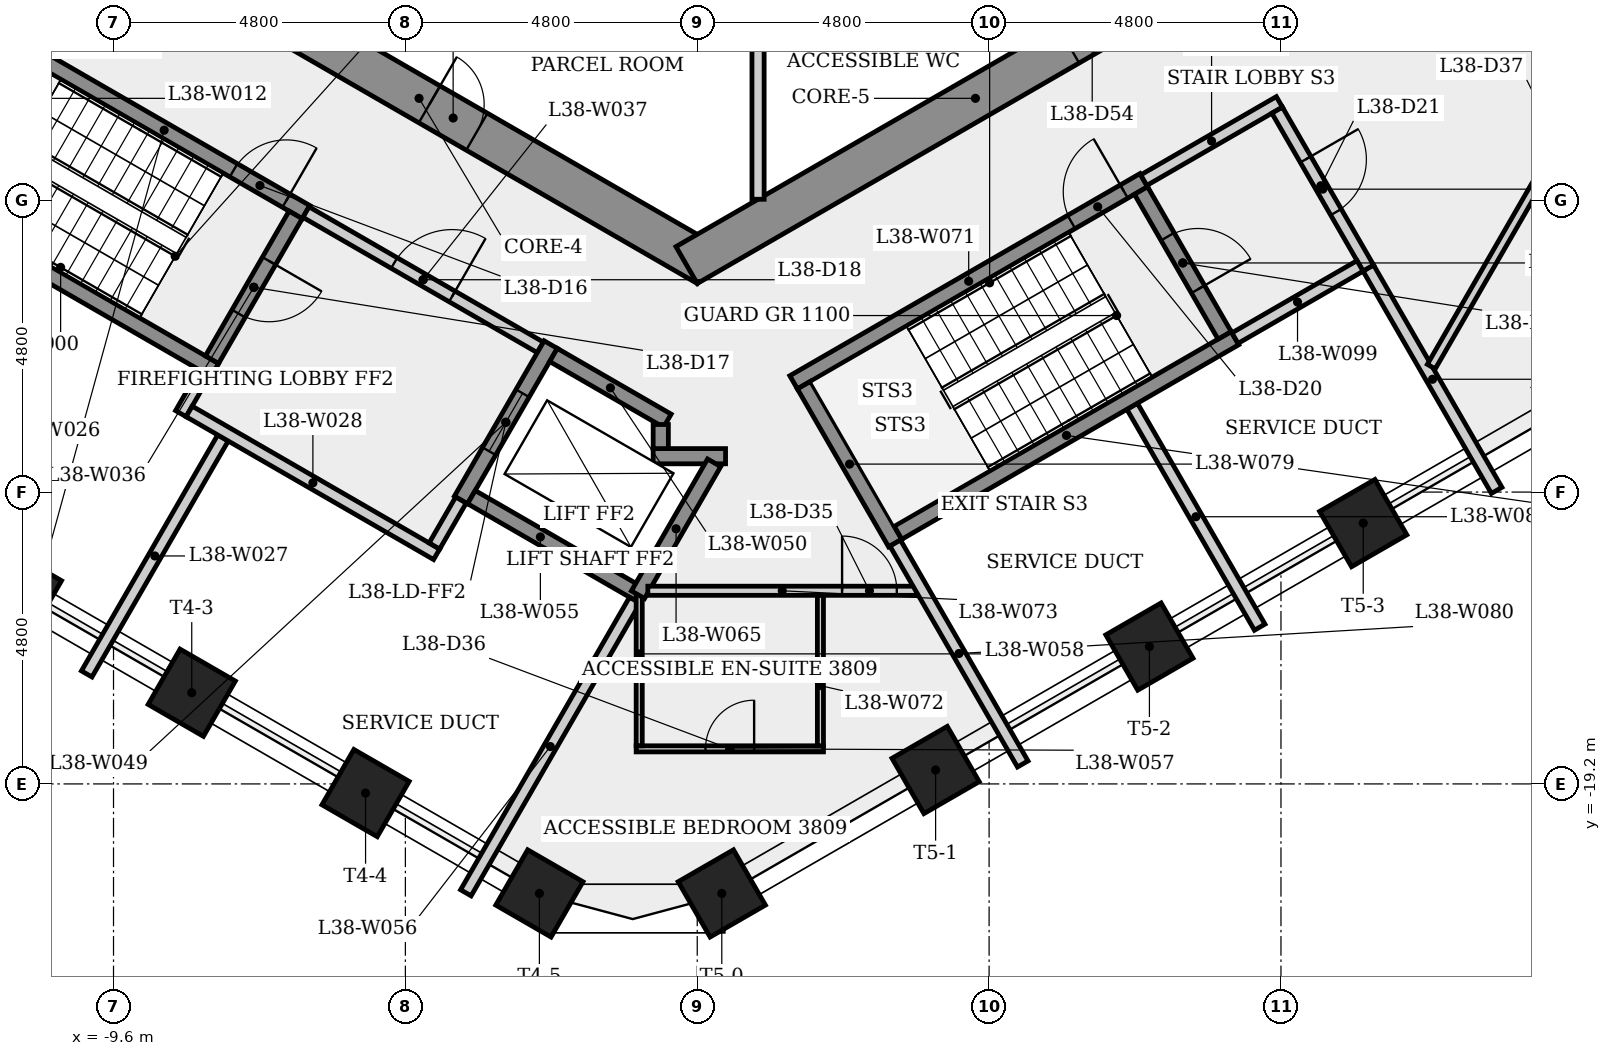
"""IFC4 building model, lengths in metres.
Left out: names, types, materials, properties, quantities, classifications, styles, units other than length and angle.
Written with IfcOpenShell. Run it as: python <this file> out.ifc"""

import sys

from ifc_helpers import new_model, si_unit, direction, frame, frame_2d, origin, origin_2d, place, context, subcontext, project, spatial, rectangle, extrude, element, fill, save


model = new_model("IFC4")
c1 = context("Model", 3, precision=1e-05, world=origin(), true_north=direction((0.0, 1.0)))
c2 = subcontext(c1, "Body", "Model", "MODEL_VIEW")
j1 = project(units=[si_unit("LENGTHUNIT", "METRE"), si_unit("PLANEANGLEUNIT", "RADIAN")], contexts=[c1])
p1 = place(None, origin())
s1 = spatial("IfcSite", under=j1, at=p1, CompositionType="ELEMENT")
p2 = place(p1, origin())
s2 = spatial("IfcBuilding", under=s1, at=p2, CompositionType="ELEMENT")
p3 = place(p2, frame((0.0, 0.0, 143.9)))
s3 = spatial("IfcBuildingStorey", under=s2, at=p3, CompositionType="ELEMENT", Elevation=143.9)
p4 = place(p3, frame((-9.325, -5.182, 0.0), z_axis=(0.0, 0.0, 1.0), x_axis=(0.866023993627, -0.500002442456, 0.0)))
e1 = element("IfcWall", 1, at=p4, inside=s3, PredefinedType="SHEAR", context=c2, shape_type="SweptSolid", body=[
    extrude(rectangle(XDim=10.97, YDim=0.7, at=frame_2d((5.485, 0.0))), origin(), (0.0, 0.0, 1.0), 4.0),
])
p5 = place(p4, frame((5.682, 0.0, 0.0)))
e2 = element("IfcOpeningElement", 2, at=p5, cuts=e1, PredefinedType="OPENING", context=c2, shape_type="SweptSolid", body=[
    extrude(rectangle(XDim=0.9, YDim=2.1, at=frame_2d((0.45, 1.05))), frame((0.0, 0.36, 0.0), z_axis=(0.0, -1.0, 0.0), x_axis=(1.0, 0.0, 0.0)), (0.0, 0.0, 1.0), 0.72),
])
p6 = place(p3, frame((-0.175, -10.667, 0.0), z_axis=(0.0, 0.0, 1.0), x_axis=(0.866023993627, 0.500002442456, 0.0)))
e3 = element("IfcWall", 3, at=p6, inside=s3, PredefinedType="SHEAR", context=c2, shape_type="SweptSolid", body=[
    extrude(rectangle(XDim=10.97, YDim=0.7, at=frame_2d((5.485, 0.0))), origin(), (0.0, 0.0, 1.0), 4.0),
])
p7 = place(p6, frame((7.252, 0.0, 0.0)))
e4 = element("IfcOpeningElement", 4, at=p7, cuts=e3, PredefinedType="OPENING", context=c2, shape_type="SweptSolid", body=[
    extrude(rectangle(XDim=0.9, YDim=2.1, at=frame_2d((0.45, 1.05))), frame((0.0, 0.36, 0.0), z_axis=(0.0, -1.0, 0.0), x_axis=(1.0, 0.0, 0.0)), (0.0, 0.0, 1.0), 0.72),
])
for number, where, z_axis, x_axis in (
    (5, (-11.172, -16.05, 0.0), (0.0, 0.0, 1.0), (-0.5, -0.866, 0.0)),
    (6, (-8.313, -17.7, 0.0), (0.0, 0.0, 1.0), (-0.5, -0.866, 0.0)),
    (7, (-5.455, -19.351, 0.0), (0.0, 0.0, 1.0), (-0.5, -0.866, 0.0)),
    (8, (-2.596, -21.001, 0.0), (0.0, 0.0, 1.0), (-0.5, -0.866, 0.0)),
    (9, (0.404, -21.001, 0.0), (0.0, 0.0, 1.0), (0.5, -0.866, 0.0)),
    (10, (3.92, -18.971, 0.0), (0.0, 0.0, 1.0), (0.5, -0.866, 0.0)),
    (11, (7.437, -16.941, 0.0), (0.0, 0.0, 1.0), (0.5, -0.866, 0.0)),
    (12, (10.953, -14.911, 0.0), (0.0, 0.0, 1.0), (0.5, -0.866, 0.0)),
):
    element("IfcColumn", number, at=place(p3, frame(where, z_axis=z_axis, x_axis=x_axis)), inside=s3, PredefinedType="COLUMN", context=c2, shape_type="SweptSolid", body=[
        extrude(rectangle(XDim=1.05, YDim=1.05, at=origin_2d()), origin(), (0.0, 0.0, 1.0), 4.0),
    ])
p8 = place(p3, frame((-11.1, -7.101, 0.0), z_axis=(0.0, 0.0, 1.0), x_axis=(0.866028615007, -0.499994437958, 0.0)))
e13 = element("IfcWall", 13, at=p8, inside=s3, PredefinedType="SHEAR", context=c2, shape_type="SweptSolid", body=[
    extrude(rectangle(XDim=5.387, YDim=0.25, at=frame_2d((2.694, 0.0))), origin(), (0.0, 0.0, 1.0), 3.6),
])
p9 = place(p8, frame((4.012, 0.0, 0.0)))
e14 = element("IfcOpeningElement", 14, at=p9, cuts=e13, PredefinedType="OPENING", context=c2, shape_type="SweptSolid", body=[
    extrude(rectangle(XDim=1.0, YDim=2.1, at=frame_2d((0.5, 1.05))), frame((0.0, 0.135, 0.0), z_axis=(0.0, -1.0, 0.0), x_axis=(1.0, 0.0, 0.0)), (0.0, 0.0, 1.0), 0.27),
])
p10 = place(p3, frame((-8.493, -13.11, 0.0), z_axis=(0.0, 0.0, 1.0), x_axis=(0.500067724834, 0.865986299303, 0.0)))
e15 = element("IfcWall", 15, at=p10, inside=s3, PredefinedType="PLUMBINGWALL", context=c2, shape_type="SweptSolid", body=[
    extrude(rectangle(XDim=0.775, YDim=0.2, at=frame_2d((0.388, 0.0))), origin(), (0.0, 0.0, 1.0), 3.6),
])
p11 = place(p3, frame((-7.935, -12.393, 0.0), z_axis=(0.0, 0.0, 1.0), x_axis=(-0.866025499775, 0.499999833739, 0.0)))
e16 = element("IfcWall", 16, at=p11, inside=s3, PredefinedType="SHEAR", context=c2, shape_type="SweptSolid", body=[
    extrude(rectangle(XDim=6.4, YDim=0.25, at=frame_2d((3.2, 0.0))), origin(), (0.0, 0.0, 1.0), 3.6),
])
p12 = place(p3, frame((-7.8, -13.51, 0.0), z_axis=(0.0, 0.0, 1.0), x_axis=(-0.499994393058, -0.866028640929, 0.0)))
e17 = element("IfcWall", 17, at=p12, inside=s3, PredefinedType="PLUMBINGWALL", context=c2, shape_type="SweptSolid", body=[
    extrude(rectangle(XDim=4.481, YDim=0.2, at=frame_2d((2.241, 0.0))), origin(), (0.0, 0.0, 1.0), 3.6),
])
p13 = place(p3, frame((-8.356, -13.073, 0.0), z_axis=(0.0, 0.0, 1.0), x_axis=(0.866038532462, -0.499977259774, 0.0)))
e18 = element("IfcWall", 18, at=p13, inside=s3, PredefinedType="PLUMBINGWALL", context=c2, shape_type="SweptSolid", body=[
    extrude(rectangle(XDim=4.7, YDim=0.2, at=frame_2d((2.35, 0.0))), origin(), (0.0, 0.0, 1.0), 3.6),
])
p14 = place(p3, frame((-6.605, -9.841, 0.0), z_axis=(0.0, 0.0, 1.0), x_axis=(-0.499996545922, -0.866027397988, 0.0)))
e19 = element("IfcWall", 19, at=p14, inside=s3, PredefinedType="SHEAR", context=c2, shape_type="SweptSolid", body=[
    extrude(rectangle(XDim=2.75, YDim=0.25, at=frame_2d((1.375, 0.0))), origin(), (0.0, 0.0, 1.0), 3.6),
])
p15 = place(p14, frame((0.875, 0.0, 0.0)))
e20 = element("IfcOpeningElement", 20, at=p15, cuts=e19, PredefinedType="OPENING", context=c2, shape_type="SweptSolid", body=[
    extrude(rectangle(XDim=1.0, YDim=2.1, at=frame_2d((0.5, 1.05))), frame((0.0, 0.135, 0.0), z_axis=(0.0, -1.0, 0.0), x_axis=(1.0, 0.0, 0.0)), (0.0, 0.0, 1.0), 0.27),
])
p16 = place(p3, frame((-6.435, -9.795, 0.0), z_axis=(0.0, 0.0, 1.0), x_axis=(0.866012907634, -0.500021643343, 0.0)))
e21 = element("IfcWall", 21, at=p16, inside=s3, PredefinedType="PARTITIONING", context=c2, shape_type="SweptSolid", body=[
    extrude(rectangle(XDim=4.45, YDim=0.2, at=frame_2d((2.225, 0.0))), origin(), (0.0, 0.0, 1.0), 3.6),
])
p17 = place(p16, frame((1.675, 0.0, 0.0)))
e22 = element("IfcOpeningElement", 22, at=p17, cuts=e21, PredefinedType="OPENING", context=c2, shape_type="SweptSolid", body=[
    extrude(rectangle(XDim=1.1, YDim=2.1, at=frame_2d((0.55, 1.05))), frame((0.0, 0.11, 0.0), z_axis=(0.0, -1.0, 0.0), x_axis=(1.0, 0.0, 0.0)), (0.0, 0.0, 1.0), 0.22),
])
p18 = place(p3, frame((-3.885, -14.529, 0.0), z_axis=(0.0, 0.0, 1.0), x_axis=(-0.499859285417, -0.866106630146, 0.0)))
e23 = element("IfcWall", 23, at=p18, inside=s3, PredefinedType="PLUMBINGWALL", context=c2, shape_type="SweptSolid", body=[
    extrude(rectangle(XDim=0.875, YDim=0.2, at=frame_2d((0.438, 0.0))), origin(), (0.0, 0.0, 1.0), 3.6),
])
p19 = place(p3, frame((-2.41, -11.974, 0.0), z_axis=(0.0, 0.0, 1.0), x_axis=(-0.500001826776, -0.866024349092, 0.0)))
e24 = element("IfcWall", 24, at=p19, inside=s3, PredefinedType="SHEAR", context=c2, shape_type="SweptSolid", body=[
    extrude(rectangle(XDim=2.95, YDim=0.25, at=frame_2d((1.475, 0.0))), origin(), (0.0, 0.0, 1.0), 3.6),
])
p20 = place(p19, frame((0.925, 0.0, 0.0)))
e25 = element("IfcOpeningElement", 25, at=p20, cuts=e24, PredefinedType="OPENING", context=c2, shape_type="SweptSolid", body=[
    extrude(rectangle(XDim=1.1, YDim=2.1, at=frame_2d((0.55, 1.05))), frame((0.0, 0.135, 0.0), z_axis=(0.0, -1.0, 0.0), x_axis=(1.0, 0.0, 0.0)), (0.0, 0.0, 1.0), 0.27),
])
p21 = place(p3, frame((-2.364, -12.145, 0.0), z_axis=(0.0, 0.0, 1.0), x_axis=(0.86603892542, -0.499976579108, 0.0)))
e26 = element("IfcWall", 26, at=p21, inside=s3, PredefinedType="SHEAR", context=c2, shape_type="SweptSolid", body=[
    extrude(rectangle(XDim=2.162, YDim=0.25, at=frame_2d((1.081, 0.0))), origin(), (0.0, 0.0, 1.0), 3.6),
])
p22 = place(p3, frame((-0.878, -16.121, 0.0), z_axis=(0.0, 0.0, 1.0), x_axis=(-0.866027924134, 0.499995634601, 0.0)))
e27 = element("IfcWall", 27, at=p22, inside=s3, PredefinedType="SHEAR", context=c2, shape_type="SweptSolid", body=[
    extrude(rectangle(XDim=3.275, YDim=0.25, at=frame_2d((1.637, 0.0))), origin(), (0.0, 0.0, 1.0), 3.6),
])
p23 = place(p3, frame((-1.027, -16.179, 0.0), z_axis=(0.0, 0.0, 1.0), x_axis=(-0.499995019066, -0.866028279509, 0.0)))
e28 = element("IfcWall", 28, at=p23, inside=s3, PredefinedType="PLUMBINGWALL", context=c2, shape_type="SweptSolid", body=[
    extrude(rectangle(XDim=5.557, YDim=0.2, at=frame_2d((2.778, 0.0))), origin(), (0.0, 0.0, 1.0), 3.6),
])
p24 = place(p3, frame((-1.004, -18.623, 0.0), z_axis=(0.0, 0.0, 1.0), x_axis=(1.0, 0.0, 0.0)))
e29 = element("IfcWall", 29, at=p24, inside=s3, PredefinedType="PARTITIONING", context=c2, shape_type="SweptSolid", body=[
    extrude(rectangle(XDim=3.08, YDim=0.1, at=frame_2d((1.54, 0.0))), origin(), (0.0, 0.0, 1.0), 3.6),
])
p25 = place(p24, frame((1.14, 0.0, 0.0)))
e30 = element("IfcOpeningElement", 30, at=p25, cuts=e29, PredefinedType="OPENING", context=c2, shape_type="SweptSolid", body=[
    extrude(rectangle(XDim=0.8, YDim=2.1, at=frame_2d((0.4, 1.05))), frame((0.0, 0.06, 0.0), z_axis=(0.0, -1.0, 0.0), x_axis=(1.0, 0.0, 0.0)), (0.0, 0.0, 1.0), 0.12),
])
p26 = place(p3, frame((-0.955, -16.053, 0.0), z_axis=(0.0, 0.0, 1.0), x_axis=(0.0, -1.0, 0.0)))
e31 = element("IfcWall", 31, at=p26, inside=s3, PredefinedType="PARTITIONING", context=c2, shape_type="SweptSolid", body=[
    extrude(rectangle(XDim=2.52, YDim=0.1, at=frame_2d((1.26, 0.0))), origin(), (0.0, 0.0, 1.0), 3.6),
])
p27 = place(p3, frame((-0.725, -13.81, 0.0), z_axis=(0.0, 0.0, 1.0), x_axis=(1.0, 0.0, 0.0)))
e32 = element("IfcWall", 32, at=p27, inside=s3, PredefinedType="SHEAR", context=c2, shape_type="SweptSolid", body=[
    extrude(rectangle(XDim=1.191, YDim=0.25, at=frame_2d((0.595, 0.0))), origin(), (0.0, 0.0, 1.0), 3.6),
])
p28 = place(p3, frame((-0.6, -13.289, 0.0), z_axis=(0.0, 0.0, 1.0), x_axis=(0.0, -1.0, 0.0)))
e33 = element("IfcWall", 33, at=p28, inside=s3, PredefinedType="SHEAR", context=c2, shape_type="SweptSolid", body=[
    extrude(rectangle(XDim=0.396, YDim=0.25, at=frame_2d((0.198, 0.0))), origin(), (0.0, 0.0, 1.0), 4.0),
])
p29 = place(p3, frame((0.278, -13.918, 0.0), z_axis=(0.0, 0.0, 1.0), x_axis=(-0.49996424941, -0.866046043413, 0.0)))
e34 = element("IfcWall", 34, at=p29, inside=s3, PredefinedType="SHEAR", context=c2, shape_type="SweptSolid", body=[
    extrude(rectangle(XDim=2.506, YDim=0.25, at=frame_2d((1.253, 0.0))), origin(), (0.0, 0.0, 1.0), 4.0),
])
p30 = place(p3, frame((1.0, -5.275, 0.0), z_axis=(0.0, 0.0, 1.0), x_axis=(0.0, -1.0, 0.0)))
e35 = element("IfcWall", 35, at=p30, inside=s3, PredefinedType="PARTITIONING", context=c2, shape_type="SweptSolid", body=[
    extrude(rectangle(XDim=4.309, YDim=0.2, at=frame_2d((2.155, 0.0))), origin(), (0.0, 0.0, 1.0), 3.6),
])
p31 = place(p3, frame((1.585, -12.595, 0.0), z_axis=(0.0, 0.0, 1.0), x_axis=(0.866036417653, 0.499980922934, 0.0)))
e36 = element("IfcWall", 36, at=p31, inside=s3, PredefinedType="SHEAR", context=c2, shape_type="SweptSolid", body=[
    extrude(rectangle(XDim=6.65, YDim=0.25, at=frame_2d((3.325, 0.0))), origin(), (0.0, 0.0, 1.0), 3.6),
])
p32 = place(p31, frame((5.275, 0.0, 0.0)))
e37 = element("IfcOpeningElement", 37, at=p32, cuts=e36, PredefinedType="OPENING", context=c2, shape_type="SweptSolid", body=[
    extrude(rectangle(XDim=1.0, YDim=2.1, at=frame_2d((0.5, 1.05))), frame((0.0, 0.135, 0.0), z_axis=(0.0, -1.0, 0.0), x_axis=(1.0, 0.0, 0.0)), (0.0, 0.0, 1.0), 0.27),
])
p33 = place(p3, frame((2.026, -18.573, 0.0), z_axis=(0.0, 0.0, 1.0), x_axis=(0.0, 1.0, 0.0)))
e38 = element("IfcWall", 38, at=p33, inside=s3, PredefinedType="PARTITIONING", context=c2, shape_type="SweptSolid", body=[
    extrude(rectangle(XDim=2.475, YDim=0.1, at=frame_2d((1.238, 0.0))), origin(), (0.0, 0.0, 1.0), 3.6),
])
p34 = place(p3, frame((-0.812, -16.023, 0.0), z_axis=(0.0, 0.0, 1.0), x_axis=(1.0, 0.0, 0.0)))
e39 = element("IfcWall", 39, at=p34, inside=s3, PredefinedType="PARTITIONING", context=c2, shape_type="SweptSolid", body=[
    extrude(rectangle(XDim=4.42, YDim=0.15, at=frame_2d((2.21, 0.0))), origin(), (0.0, 0.0, 1.0), 3.6),
])
p35 = place(p34, frame((3.194, 0.0, 0.0)))
e40 = element("IfcOpeningElement", 40, at=p35, cuts=e39, PredefinedType="OPENING", context=c2, shape_type="SweptSolid", body=[
    extrude(rectangle(XDim=0.9, YDim=2.1, at=frame_2d((0.45, 1.05))), frame((0.0, 0.085, 0.0), z_axis=(0.0, -1.0, 0.0), x_axis=(1.0, 0.0, 0.0)), (0.0, 0.0, 1.0), 0.17),
])
p36 = place(p3, frame((3.256, -15.239, 0.0), z_axis=(0.0, 0.0, 1.0), x_axis=(-0.50002537861, 0.866010750942, 0.0)))
e41 = element("IfcWall", 41, at=p36, inside=s3, PredefinedType="SHEAR", context=c2, shape_type="SweptSolid", body=[
    extrude(rectangle(XDim=3.0, YDim=0.25, at=frame_2d((1.5, 0.0))), origin(), (0.0, 0.0, 1.0), 3.6),
])
for number, where, z_axis, x_axis in (
    (42, (3.256, -15.239, 0.0), (0.0, 0.0, 1.0), (0.5, -0.866, 0.0)),
    (43, (7.153, -12.989, 0.0), (0.0, 0.0, 1.0), (0.5, -0.866, 0.0)),
):
    element("IfcWall", number, at=place(p3, frame(where, z_axis=z_axis, x_axis=x_axis)), inside=s3, PredefinedType="PLUMBINGWALL", context=c2, shape_type="SweptSolid", body=[
        extrude(rectangle(XDim=4.195, YDim=0.2, at=frame_2d((2.098, 0.0))), origin(), (0.0, 0.0, 1.0), 3.6),
    ])
p37 = place(p3, frame((3.301, -15.068, 0.0), z_axis=(0.0, 0.0, 1.0), x_axis=(0.866035036182, 0.499983315828, 0.0)))
e44 = element("IfcWall", 44, at=p37, inside=s3, PredefinedType="SHEAR", context=c2, shape_type="SweptSolid", body=[
    extrude(rectangle(XDim=6.4, YDim=0.25, at=frame_2d((3.2, 0.0))), origin(), (0.0, 0.0, 1.0), 4.0),
])
p38 = place(p3, frame((7.298, -9.441, 0.0), z_axis=(0.0, 0.0, 1.0), x_axis=(0.500034990121, -0.866005201286, 0.0)))
e45 = element("IfcWall", 45, at=p38, inside=s3, PredefinedType="SHEAR", context=c2, shape_type="SweptSolid", body=[
    extrude(rectangle(XDim=2.75, YDim=0.25, at=frame_2d((1.375, 0.0))), origin(), (0.0, 0.0, 1.0), 3.6),
])
p39 = place(p38, frame((0.875, 0.0, 0.0)))
e46 = element("IfcOpeningElement", 46, at=p39, cuts=e45, PredefinedType="OPENING", context=c2, shape_type="SweptSolid", body=[
    extrude(rectangle(XDim=1.0, YDim=2.1, at=frame_2d((0.5, 1.05))), frame((0.0, 0.135, 0.0), z_axis=(0.0, -1.0, 0.0), x_axis=(1.0, 0.0, 0.0)), (0.0, 0.0, 1.0), 0.27),
])
p40 = place(p3, frame((7.344, -9.27, 0.0), z_axis=(0.0, 0.0, 1.0), x_axis=(0.866005588531, 0.500034319456, 0.0)))
e47 = element("IfcWall", 47, at=p40, inside=s3, PredefinedType="PARTITIONING", context=c2, shape_type="SweptSolid", body=[
    extrude(rectangle(XDim=2.575, YDim=0.2, at=frame_2d((1.288, 0.0))), origin(), (0.0, 0.0, 1.0), 3.6),
])
p41 = place(p3, frame((9.537, -8.119, 0.0), z_axis=(0.0, 0.0, 1.0), x_axis=(0.499990139034, -0.866031096941, 0.0)))
e48 = element("IfcWall", 48, at=p41, inside=s3, PredefinedType="PARTITIONING", context=c2, shape_type="SweptSolid", body=[
    extrude(rectangle(XDim=3.0, YDim=0.2, at=frame_2d((1.5, 0.0))), origin(), (0.0, 0.0, 1.0), 3.6),
])
p42 = place(p41, frame((0.935, 0.0, 0.0)))
e49 = element("IfcOpeningElement", 49, at=p42, cuts=e48, PredefinedType="OPENING", context=c2, shape_type="SweptSolid", body=[
    extrude(rectangle(XDim=1.0, YDim=2.1, at=frame_2d((0.5, 1.05))), frame((0.0, 0.11, 0.0), z_axis=(0.0, -1.0, 0.0), x_axis=(1.0, 0.0, 0.0)), (0.0, 0.0, 1.0), 0.22),
])
p43 = place(p3, frame((10.901, -10.681, 0.0), z_axis=(0.0, 0.0, 1.0), x_axis=(-0.866007538022, -0.500030943131, 0.0)))
e50 = element("IfcWall", 50, at=p43, inside=s3, PredefinedType="PLUMBINGWALL", context=c2, shape_type="SweptSolid", body=[
    extrude(rectangle(XDim=2.375, YDim=0.2, at=frame_2d((1.188, 0.0))), origin(), (0.0, 0.0, 1.0), 3.6),
])
p44 = place(p3, frame((11.037, -10.717, 0.0), z_axis=(0.0, 0.0, 1.0), x_axis=(0.500002884005, -0.866023738697, 0.0)))
e51 = element("IfcWall", 51, at=p44, inside=s3, PredefinedType="PLUMBINGWALL", context=c2, shape_type="SweptSolid", body=[
    extrude(rectangle(XDim=4.22, YDim=0.2, at=frame_2d((2.11, 0.0))), origin(), (0.0, 0.0, 1.0), 3.6),
])
p45 = place(p3, frame((16.285, -5.041, 0.0), z_axis=(0.0, 0.0, 1.0), x_axis=(-0.499997548519, -0.866026819143, 0.0)))
e52 = element("IfcWall", 52, at=p45, inside=s3, PredefinedType="PARTITIONING", context=c2, shape_type="SweptSolid", body=[
    extrude(rectangle(XDim=8.425, YDim=0.15, at=frame_2d((4.212, 0.0))), origin(), (0.0, 0.0, 1.0), 3.6),
])
p46 = place(p45, frame((3.712, 0.0, 0.0)))
e53 = element("IfcOpeningElement", 53, at=p46, cuts=e52, PredefinedType="OPENING", context=c2, shape_type="SweptSolid", body=[
    extrude(rectangle(XDim=1.0, YDim=2.1, at=frame_2d((0.5, 1.05))), frame((0.0, 0.085, 0.0), z_axis=(0.0, -1.0, 0.0), x_axis=(1.0, 0.0, 0.0)), (0.0, 0.0, 1.0), 0.17),
])
p47 = place(p9, origin())
e54 = element("IfcDoor", 54, at=p47, inside=s3, OperationType="SINGLE_SWING_RIGHT", PredefinedType="DOOR", context=c2, shape_type="SweptSolid", body=[
    extrude(rectangle(XDim=1.0, YDim=2.1, at=frame_2d((0.5, 1.05))), frame((0.0, 0.025, 0.0), z_axis=(0.0, -1.0, 0.0), x_axis=(1.0, 0.0, 0.0)), (0.0, 0.0, 1.0), 0.05),
])
fill(e14, e54)
p48 = place(p15, origin())
e55 = element("IfcDoor", 55, at=p48, inside=s3, OperationType="SINGLE_SWING_LEFT", PredefinedType="DOOR", context=c2, shape_type="SweptSolid", body=[
    extrude(rectangle(XDim=1.0, YDim=2.1, at=frame_2d((0.5, 1.05))), frame((0.0, 0.025, 0.0), z_axis=(0.0, -1.0, 0.0), x_axis=(1.0, 0.0, 0.0)), (0.0, 0.0, 1.0), 0.05),
])
fill(e20, e55)
p49 = place(p17, origin())
e56 = element("IfcDoor", 56, at=p49, inside=s3, OperationType="SINGLE_SWING_RIGHT", PredefinedType="DOOR", context=c2, shape_type="SweptSolid", body=[
    extrude(rectangle(XDim=1.1, YDim=2.1, at=frame_2d((0.55, 1.05))), frame((0.0, 0.025, 0.0), z_axis=(0.0, -1.0, 0.0), x_axis=(1.0, 0.0, 0.0)), (0.0, 0.0, 1.0), 0.05),
])
fill(e22, e56)
p50 = place(p20, origin())
e57 = element("IfcDoor", 57, at=p50, inside=s3, OperationType="SLIDING_TO_LEFT", PredefinedType="DOOR", context=c2, shape_type="SweptSolid", body=[
    extrude(rectangle(XDim=1.1, YDim=2.1, at=frame_2d((0.55, 1.05))), frame((0.0, 0.025, 0.0), z_axis=(0.0, -1.0, 0.0), x_axis=(1.0, 0.0, 0.0)), (0.0, 0.0, 1.0), 0.05),
])
fill(e25, e57)
p51 = place(p32, origin())
e58 = element("IfcDoor", 58, at=p51, inside=s3, OperationType="SINGLE_SWING_RIGHT", PredefinedType="DOOR", context=c2, shape_type="SweptSolid", body=[
    extrude(rectangle(XDim=1.0, YDim=2.1, at=frame_2d((0.5, 1.05))), frame((0.0, 0.025, 0.0), z_axis=(0.0, -1.0, 0.0), x_axis=(1.0, 0.0, 0.0)), (0.0, 0.0, 1.0), 0.05),
])
fill(e37, e58)
p52 = place(p42, origin())
e59 = element("IfcDoor", 59, at=p52, inside=s3, OperationType="SINGLE_SWING_LEFT", PredefinedType="DOOR", context=c2, shape_type="SweptSolid", body=[
    extrude(rectangle(XDim=1.0, YDim=2.1, at=frame_2d((0.5, 1.05))), frame((0.0, 0.025, 0.0), z_axis=(0.0, -1.0, 0.0), x_axis=(1.0, 0.0, 0.0)), (0.0, 0.0, 1.0), 0.05),
])
fill(e49, e59)
p53 = place(p39, origin())
e60 = element("IfcDoor", 60, at=p53, inside=s3, OperationType="SINGLE_SWING_RIGHT", PredefinedType="DOOR", context=c2, shape_type="SweptSolid", body=[
    extrude(rectangle(XDim=1.0, YDim=2.1, at=frame_2d((0.5, 1.05))), frame((0.0, 0.025, 0.0), z_axis=(0.0, -1.0, 0.0), x_axis=(1.0, 0.0, 0.0)), (0.0, 0.0, 1.0), 0.05),
])
fill(e46, e60)
p54 = place(p35, origin())
e61 = element("IfcDoor", 61, at=p54, inside=s3, OperationType="SINGLE_SWING_LEFT", PredefinedType="DOOR", context=c2, shape_type="SweptSolid", body=[
    extrude(rectangle(XDim=0.9, YDim=2.1, at=frame_2d((0.45, 1.05))), frame((0.0, 0.025, 0.0), z_axis=(0.0, -1.0, 0.0), x_axis=(1.0, 0.0, 0.0)), (0.0, 0.0, 1.0), 0.05),
])
fill(e40, e61)
p55 = place(p25, origin())
e62 = element("IfcDoor", 62, at=p55, inside=s3, OperationType="SINGLE_SWING_RIGHT", PredefinedType="DOOR", context=c2, shape_type="SweptSolid", body=[
    extrude(rectangle(XDim=0.8, YDim=2.1, at=frame_2d((0.4, 1.05))), frame((0.0, 0.025, 0.0), z_axis=(0.0, -1.0, 0.0), x_axis=(1.0, 0.0, 0.0)), (0.0, 0.0, 1.0), 0.05),
])
fill(e30, e62)
p56 = place(p5, origin())
e63 = element("IfcDoor", 63, at=p56, inside=s3, OperationType="SINGLE_SWING_LEFT", PredefinedType="DOOR", context=c2, shape_type="SweptSolid", body=[
    extrude(rectangle(XDim=0.9, YDim=2.1, at=frame_2d((0.45, 1.05))), frame((0.0, 0.025, 0.0), z_axis=(0.0, -1.0, 0.0), x_axis=(1.0, 0.0, 0.0)), (0.0, 0.0, 1.0), 0.05),
])
fill(e2, e63)
save(model, sys.argv[1])
